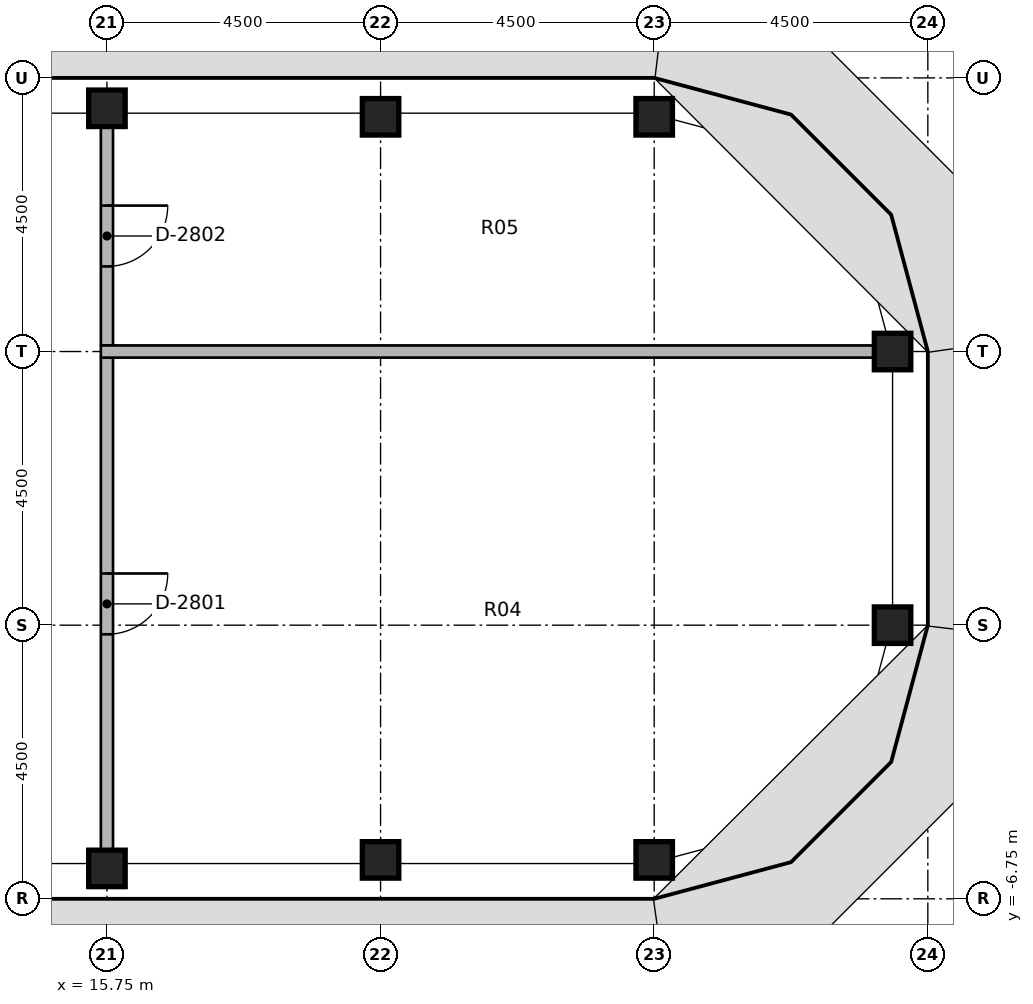
"""IFC4 building model, lengths in metres.
Left out: names, types, materials, properties, quantities, classifications, styles, units other than length and angle.
Written with IfcOpenShell. Run it as: python <this file> out.ifc"""

import sys

from ifc_helpers import new_model, si_unit, direction, frame, frame_2d, origin, origin_2d, place, context, subcontext, project, spatial, rectangle, extrude, element, fill, save


model = new_model("IFC4")
c1 = context("Model", 3, precision=1e-05, world=origin(), true_north=direction((0.0, 1.0)))
c2 = subcontext(c1, "Body", "Model", "MODEL_VIEW")
j1 = project(units=[si_unit("LENGTHUNIT", "METRE"), si_unit("PLANEANGLEUNIT", "RADIAN")], contexts=[c1])
p1 = place(None, origin())
s1 = spatial("IfcSite", under=j1, at=p1, CompositionType="ELEMENT")
p2 = place(p1, origin())
s2 = spatial("IfcBuilding", under=s1, at=p2, CompositionType="ELEMENT")
p3 = place(p2, frame((0.0, 0.0, 265.0)))
s3 = spatial("IfcBuildingStorey", under=s2, at=p3, CompositionType="ELEMENT", Elevation=265.0)
for number, where, z_axis, x_axis in (
    (1, (15.75, -6.25, 0.0), (0.0, 0.0, 1.0), (1.0, 0.0, 0.0)),
    (2, (15.75, 6.25, 0.0), (0.0, 0.0, 1.0), (1.0, 0.0, 0.0)),
    (3, (20.25, -6.11, 0.0), (0.0, 0.0, 1.0), (1.0, 0.0, 0.0)),
    (4, (20.25, 6.11, 0.0), (0.0, 0.0, 1.0), (1.0, 0.0, 0.0)),
    (5, (24.75, -6.11, 0.0), (0.0, 0.0, 1.0), (1.0, 0.0, 0.0)),
    (6, (24.75, 6.11, 0.0), (0.0, 0.0, 1.0), (1.0, 0.0, 0.0)),
    (7, (28.67, -2.25, 0.0), (0.0, 0.0, 1.0), (1.0, 0.0, 0.0)),
    (8, (28.67, 2.25, 0.0), (0.0, 0.0, 1.0), (1.0, 0.0, 0.0)),
):
    element("IfcColumn", number, at=place(p3, frame(where, z_axis=z_axis, x_axis=x_axis)), inside=s3, PredefinedType="COLUMN", context=c2, shape_type="SweptSolid", body=[
        extrude(rectangle(XDim=0.6, YDim=0.6, at=origin_2d()), origin(), (0.0, 0.0, 1.0), 3.65),
    ])
p4 = place(p3, frame((15.75, 2.15, 0.0), z_axis=(0.0, 0.0, 1.0), x_axis=(0.0, -1.0, 0.0)))
e9 = element("IfcWall", 9, at=p4, inside=s3, PredefinedType="PARTITIONING", context=c2, shape_type="SweptSolid", body=[
    extrude(rectangle(XDim=8.1, YDim=0.2, at=frame_2d((4.05, 0.0))), origin(), (0.0, 0.0, 1.0), 2.75),
])
p5 = place(p4, frame((3.55, 0.0, 0.0)))
e10 = element("IfcOpeningElement", 10, at=p5, cuts=e9, PredefinedType="OPENING", context=c2, shape_type="SweptSolid", body=[
    extrude(rectangle(XDim=1.0, YDim=2.1, at=frame_2d((0.5, 1.05))), frame((0.0, 0.11, 0.0), z_axis=(0.0, -1.0, 0.0), x_axis=(1.0, 0.0, 0.0)), (0.0, 0.0, 1.0), 0.22),
])
p6 = place(p3, frame((15.75, 5.95, 0.0), z_axis=(0.0, 0.0, 1.0), x_axis=(0.0, -1.0, 0.0)))
e11 = element("IfcWall", 11, at=p6, inside=s3, PredefinedType="PARTITIONING", context=c2, shape_type="SweptSolid", body=[
    extrude(rectangle(XDim=3.6, YDim=0.2, at=frame_2d((1.8, 0.0))), origin(), (0.0, 0.0, 1.0), 2.75),
])
p7 = place(p6, frame((1.3, 0.0, 0.0)))
e12 = element("IfcOpeningElement", 12, at=p7, cuts=e11, PredefinedType="OPENING", context=c2, shape_type="SweptSolid", body=[
    extrude(rectangle(XDim=1.0, YDim=2.1, at=frame_2d((0.5, 1.05))), frame((0.0, 0.11, 0.0), z_axis=(0.0, -1.0, 0.0), x_axis=(1.0, 0.0, 0.0)), (0.0, 0.0, 1.0), 0.22),
])
p8 = place(p3, frame((15.65, 2.25, 0.0), z_axis=(0.0, 0.0, 1.0), x_axis=(1.0, 0.0, 0.0)))
e13 = element("IfcWall", 13, at=p8, inside=s3, PredefinedType="PARTITIONING", context=c2, shape_type="SweptSolid", body=[
    extrude(rectangle(XDim=12.72, YDim=0.2, at=frame_2d((6.36, 0.0))), origin(), (0.0, 0.0, 1.0), 2.75),
])
p9 = place(p5, origin())
e14 = element("IfcDoor", 14, at=p9, inside=s3, OperationType="SINGLE_SWING_RIGHT", PredefinedType="DOOR", context=c2, shape_type="SweptSolid", body=[
    extrude(rectangle(XDim=1.0, YDim=2.1, at=frame_2d((0.5, 1.05))), frame((0.0, 0.025, 0.0), z_axis=(0.0, -1.0, 0.0), x_axis=(1.0, 0.0, 0.0)), (0.0, 0.0, 1.0), 0.05),
])
fill(e10, e14)
p10 = place(p7, origin())
e15 = element("IfcDoor", 15, at=p10, inside=s3, OperationType="SINGLE_SWING_LEFT", PredefinedType="DOOR", context=c2, shape_type="SweptSolid", body=[
    extrude(rectangle(XDim=1.0, YDim=2.1, at=frame_2d((0.5, 1.05))), frame((0.0, 0.025, 0.0), z_axis=(0.0, -1.0, 0.0), x_axis=(1.0, 0.0, 0.0)), (0.0, 0.0, 1.0), 0.05),
])
fill(e12, e15)
save(model, sys.argv[1])
